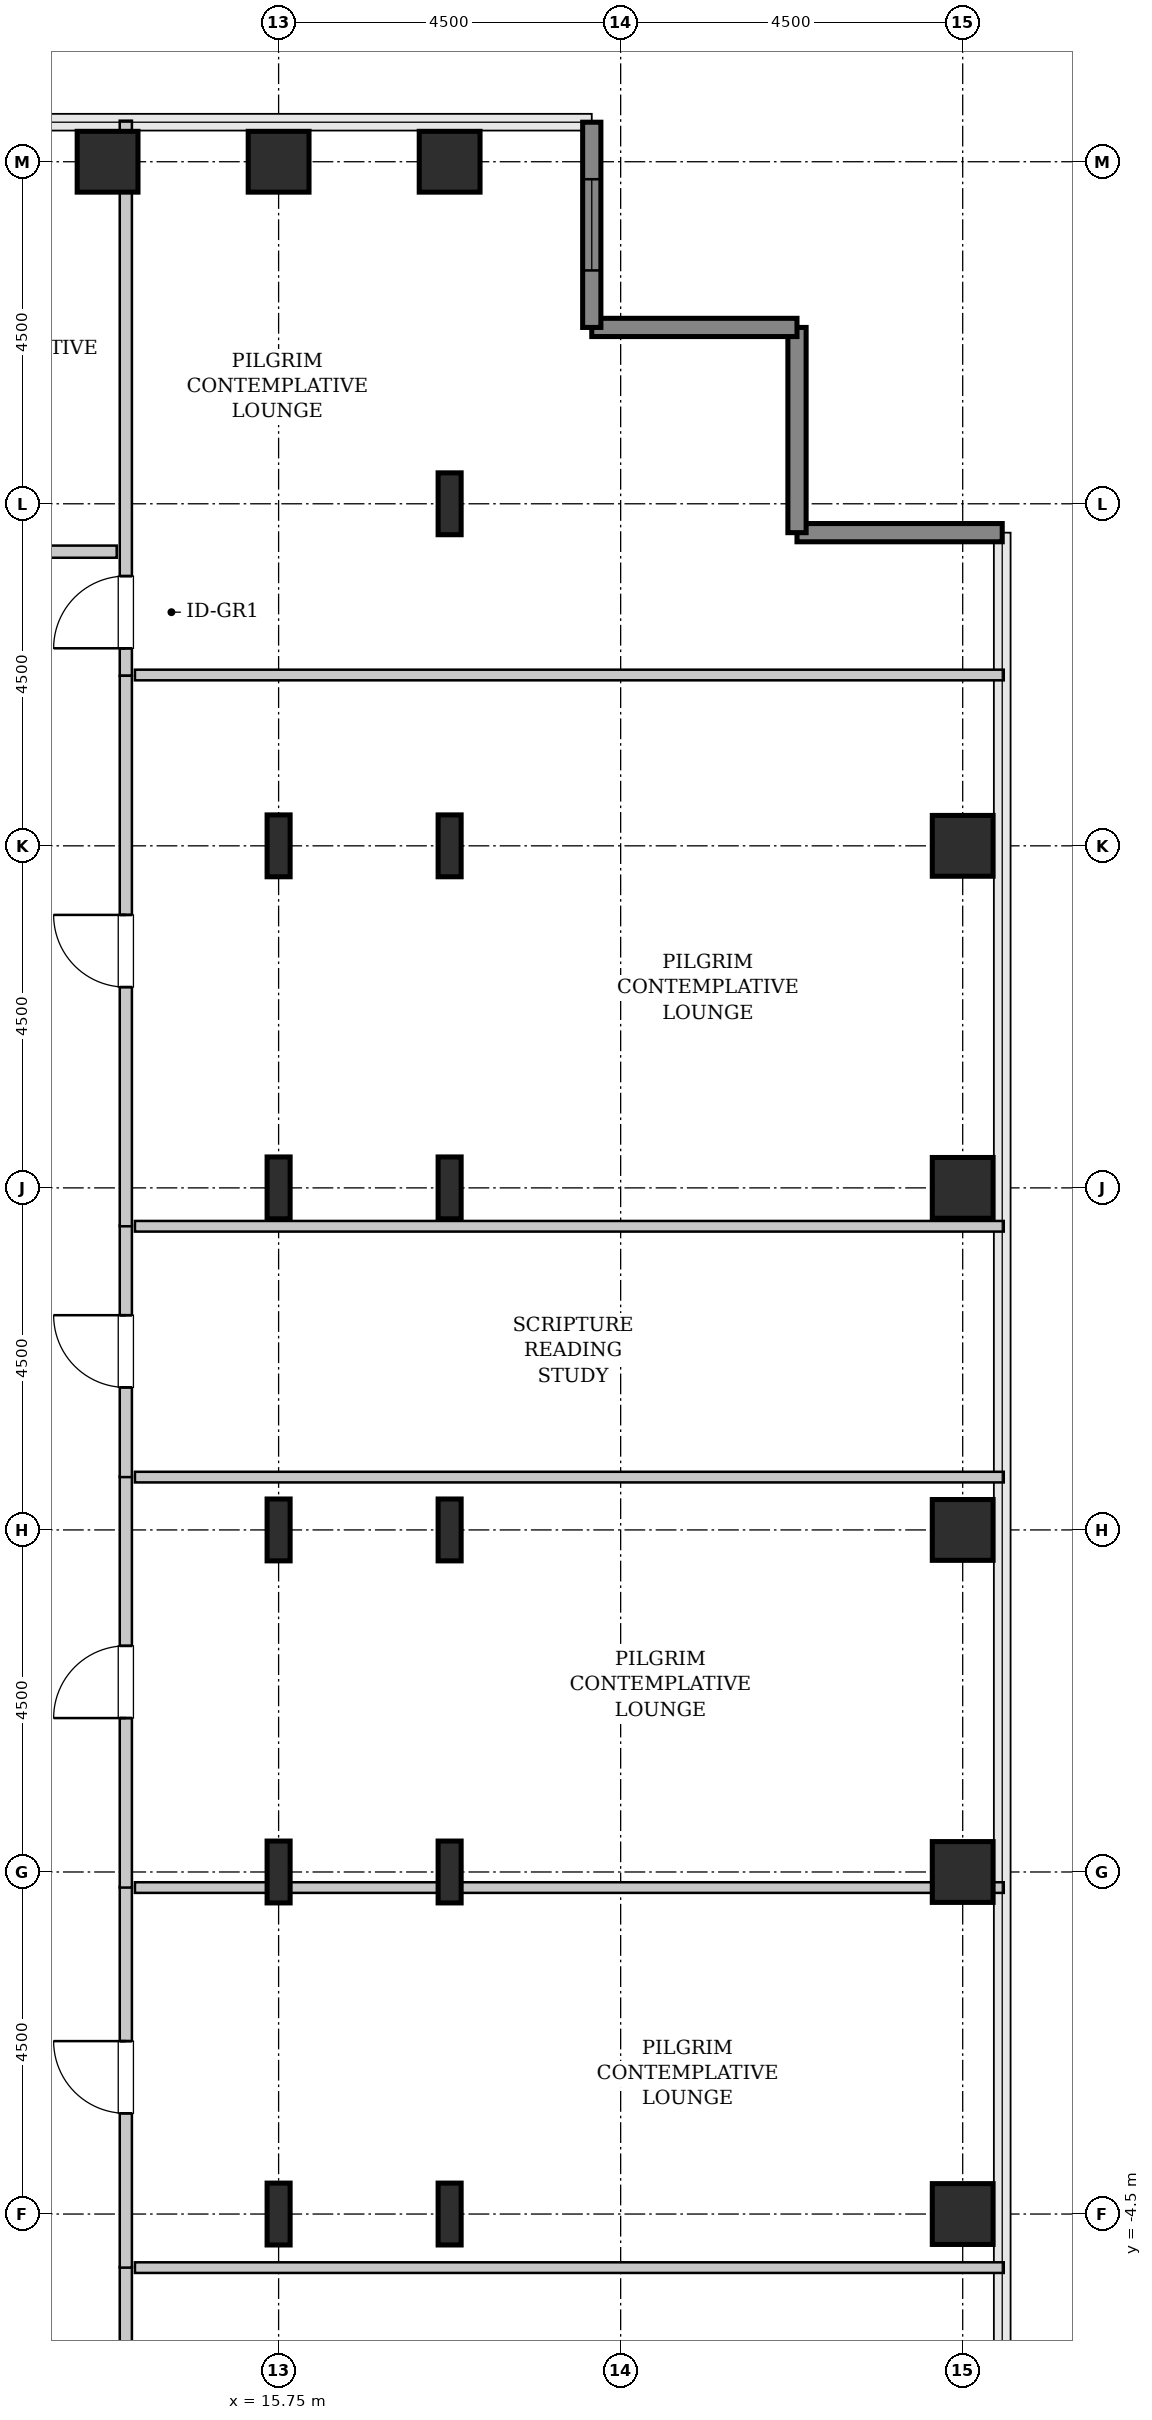
"""IFC4 building model, lengths in metres.
Left out: names, types, materials, properties, quantities, classifications, styles, units other than length and angle.
Written with IfcOpenShell. Run it as: python <this file> out.ifc"""

import sys

from ifc_helpers import new_model, si_unit, direction, frame, frame_2d, origin, origin_2d, place, context, subcontext, project, spatial, rectangle, hollow_rectangle, i_section, extrude, source, transform, mapped, element, fill, save


model = new_model("IFC4")
c1 = context("Model", 3, precision=1e-05, world=origin(), true_north=direction((0.0, 1.0)))
c2 = subcontext(c1, "Body", "Model", "MODEL_VIEW")
j1 = project(units=[si_unit("LENGTHUNIT", "METRE"), si_unit("PLANEANGLEUNIT", "RADIAN")], contexts=[c1])
p1 = place(None, origin())
s1 = spatial("IfcSite", under=j1, at=p1, CompositionType="ELEMENT")
p2 = place(p1, origin())
s2 = spatial("IfcBuilding", under=s1, at=p2, CompositionType="ELEMENT")
p3 = place(p2, frame((0.0, 0.0, 179.2)))
s3 = spatial("IfcBuildingStorey", under=s2, at=p3, CompositionType="ELEMENT", Elevation=179.2)
m1 = source(origin(), c2, "Body", "SweptSolid", [
    extrude(hollow_rectangle(XDim=0.8, YDim=0.8, WallThickness=0.04, InnerFilletRadius=0.04, OuterFilletRadius=0.08, at=origin_2d()), origin(), (0.0, 0.0, 1.0), 3.8),
])
p4 = place(p3, frame((13.5, 22.5, 0.0), z_axis=(0.0, 0.0, 1.0), x_axis=(1.0, 0.0, 0.0)))
e1 = element("IfcColumn", 1, at=p4, inside=s3, PredefinedType="COLUMN", context=c2, shape_type="MappedRepresentation", body=[
    mapped(m1, transform((0.0, 0.0, 0.0), x_axis=(1.0, 0.0, 0.0), y_axis=(0.0, 1.0, 0.0), z_axis=(0.0, 0.0, 1.0), scale=1.0)),
])
m2 = source(origin(), c2, "Body", "SweptSolid", [
    extrude(i_section(OverallWidth=0.303, OverallDepth=0.814, WebThickness=0.021, FlangeThickness=0.04, FilletRadius=0.03, at=origin_2d()), origin(), (0.0, 0.0, 1.0), 3.8),
])
for number, where, z_axis, x_axis in (
    (2, (15.75, -4.5, 0.0), (0.0, 0.0, 1.0), (1.0, 0.0, 0.0)),
    (3, (15.75, 0.0, 0.0), (0.0, 0.0, 1.0), (1.0, 0.0, 0.0)),
    (4, (15.75, 4.5, 0.0), (0.0, 0.0, 1.0), (1.0, 0.0, 0.0)),
    (5, (15.75, 9.0, 0.0), (0.0, 0.0, 1.0), (1.0, 0.0, 0.0)),
    (6, (15.75, 13.5, 0.0), (0.0, 0.0, 1.0), (1.0, 0.0, 0.0)),
):
    element("IfcColumn", number, at=place(p3, frame(where, z_axis=z_axis, x_axis=x_axis)), inside=s3, PredefinedType="COLUMN", context=c2, shape_type="MappedRepresentation", body=[
        mapped(m2, transform((0.0, 0.0, 0.0), x_axis=(1.0, 0.0, 0.0), y_axis=(0.0, 1.0, 0.0), z_axis=(0.0, 0.0, 1.0), scale=1.0)),
    ])
p5 = place(p3, frame((15.75, 22.5, 0.0), z_axis=(0.0, 0.0, 1.0), x_axis=(1.0, 0.0, 0.0)))
e7 = element("IfcColumn", 7, at=p5, inside=s3, PredefinedType="COLUMN", context=c2, shape_type="MappedRepresentation", body=[
    mapped(m1, transform((0.0, 0.0, 0.0), x_axis=(1.0, 0.0, 0.0), y_axis=(0.0, 1.0, 0.0), z_axis=(0.0, 0.0, 1.0), scale=1.0)),
])
for number, where, z_axis, x_axis in (
    (8, (18.0, -4.5, 0.0), (0.0, 0.0, 1.0), (1.0, 0.0, 0.0)),
    (9, (18.0, 0.0, 0.0), (0.0, 0.0, 1.0), (1.0, 0.0, 0.0)),
    (10, (18.0, 4.5, 0.0), (0.0, 0.0, 1.0), (1.0, 0.0, 0.0)),
    (11, (18.0, 9.0, 0.0), (0.0, 0.0, 1.0), (1.0, 0.0, 0.0)),
    (12, (18.0, 13.5, 0.0), (0.0, 0.0, 1.0), (1.0, 0.0, 0.0)),
    (13, (18.0, 18.0, 0.0), (0.0, 0.0, 1.0), (1.0, 0.0, 0.0)),
):
    element("IfcColumn", number, at=place(p3, frame(where, z_axis=z_axis, x_axis=x_axis)), inside=s3, PredefinedType="COLUMN", context=c2, shape_type="MappedRepresentation", body=[
        mapped(m2, transform((0.0, 0.0, 0.0), x_axis=(1.0, 0.0, 0.0), y_axis=(0.0, 1.0, 0.0), z_axis=(0.0, 0.0, 1.0), scale=1.0)),
    ])
for number, where, z_axis, x_axis in (
    (14, (18.0, 22.5, 0.0), (0.0, 0.0, 1.0), (1.0, 0.0, 0.0)),
    (15, (24.75, -4.5, 0.0), (0.0, 0.0, 1.0), (1.0, 0.0, 0.0)),
    (16, (24.75, 0.0, 0.0), (0.0, 0.0, 1.0), (1.0, 0.0, 0.0)),
    (17, (24.75, 4.5, 0.0), (0.0, 0.0, 1.0), (1.0, 0.0, 0.0)),
    (18, (24.75, 9.0, 0.0), (0.0, 0.0, 1.0), (1.0, 0.0, 0.0)),
    (19, (24.75, 13.5, 0.0), (0.0, 0.0, 1.0), (1.0, 0.0, 0.0)),
):
    element("IfcColumn", number, at=place(p3, frame(where, z_axis=z_axis, x_axis=x_axis)), inside=s3, PredefinedType="COLUMN", context=c2, shape_type="MappedRepresentation", body=[
        mapped(m1, transform((0.0, 0.0, 0.0), x_axis=(1.0, 0.0, 0.0), y_axis=(0.0, 1.0, 0.0), z_axis=(0.0, 0.0, 1.0), scale=1.0)),
    ])
m3 = source(origin(), c2, "Body", "SweptSolid", [
    extrude(rectangle(XDim=2.7, YDim=0.24, at=frame_2d((1.35, 0.0))), origin(), (0.0, 0.0, 1.0), 3.55),
])
for number, where, z_axis, x_axis in (
    (20, (25.27, 17.62, 0.0), (0.0, 0.0, 1.0), (-1.0, 0.0, 0.0)),
    (21, (22.57, 17.62, 0.0), (0.0, 0.0, 1.0), (0.0, 1.0, 0.0)),
    (22, (22.57, 20.32, 0.0), (0.0, 0.0, 1.0), (-1.0, 0.0, 0.0)),
):
    element("IfcWall", number, at=place(p3, frame(where, z_axis=z_axis, x_axis=x_axis)), inside=s3, PredefinedType="SHEAR", context=c2, shape_type="MappedRepresentation", body=[
        mapped(m3, transform((0.0, 0.0, 0.0), x_axis=(1.0, 0.0, 0.0), y_axis=(0.0, 1.0, 0.0), z_axis=(0.0, 0.0, 1.0), scale=1.0)),
    ])
p6 = place(p3, frame((19.87, 20.32, 0.0), z_axis=(0.0, 0.0, 1.0), x_axis=(0.0, 1.0, 0.0)))
e23 = element("IfcWall", 23, at=p6, inside=s3, PredefinedType="SHEAR", context=c2, shape_type="MappedRepresentation", body=[
    mapped(m3, transform((0.0, 0.0, 0.0), x_axis=(1.0, 0.0, 0.0), y_axis=(0.0, 1.0, 0.0), z_axis=(0.0, 0.0, 1.0), scale=1.0)),
])
p7 = place(p6, frame((0.75, 0.0, 0.85)))
e24 = element("IfcOpeningElement", 24, at=p7, cuts=e23, PredefinedType="OPENING", context=c2, shape_type="SweptSolid", body=[
    extrude(rectangle(XDim=1.2, YDim=1.8, at=frame_2d((0.6, 0.9))), frame((0.0, 0.13, 0.0), z_axis=(0.0, -1.0, 0.0), x_axis=(1.0, 0.0, 0.0)), (0.0, 0.0, 1.0), 0.26),
])
m4 = source(origin(), c2, "Body", "SweptSolid", [
    extrude(rectangle(XDim=3.31, YDim=0.16, at=frame_2d((1.655, 0.0))), origin(), (0.0, 0.0, 1.0), 3.535),
])
p8 = place(p3, frame((13.74, -8.505, 0.0), z_axis=(0.0, 0.0, 1.0), x_axis=(0.0, 1.0, 0.0)))
e25 = element("IfcWall", 25, at=p8, inside=s3, PredefinedType="PARTITIONING", context=c2, shape_type="MappedRepresentation", body=[
    mapped(m4, transform((0.0, 0.0, 0.0), x_axis=(1.0, 0.0, 0.0), y_axis=(0.0, 1.0, 0.0), z_axis=(0.0, 0.0, 1.0), scale=1.0)),
])
p9 = place(p8, frame((1.18, 0.0, 0.0)))
e26 = element("IfcOpeningElement", 26, at=p9, cuts=e25, PredefinedType="OPENING", context=c2, shape_type="SweptSolid", body=[
    extrude(rectangle(XDim=0.95, YDim=2.1, at=frame_2d((0.475, 1.05))), frame((0.0, 0.09, 0.0), z_axis=(0.0, -1.0, 0.0), x_axis=(1.0, 0.0, 0.0)), (0.0, 0.0, 1.0), 0.18),
])
m5 = source(origin(), c2, "Body", "SweptSolid", [
    extrude(rectangle(XDim=11.43, YDim=0.14, at=frame_2d((5.715, 0.0))), origin(), (0.0, 0.0, 1.0), 3.535),
])
p10 = place(p3, frame((13.86, -5.205, 0.0), z_axis=(0.0, 0.0, 1.0), x_axis=(1.0, 0.0, 0.0)))
e27 = element("IfcWall", 27, at=p10, inside=s3, PredefinedType="PARTITIONING", context=c2, shape_type="MappedRepresentation", body=[
    mapped(m5, transform((0.0, 0.0, 0.0), x_axis=(1.0, 0.0, 0.0), y_axis=(0.0, 1.0, 0.0), z_axis=(0.0, 0.0, 1.0), scale=1.0)),
])
m6 = source(origin(), c2, "Body", "SweptSolid", [
    extrude(rectangle(XDim=5.01, YDim=0.16, at=frame_2d((2.505, 0.0))), origin(), (0.0, 0.0, 1.0), 3.535),
])
p11 = place(p3, frame((13.74, -5.205, 0.0), z_axis=(0.0, 0.0, 1.0), x_axis=(0.0, 1.0, 0.0)))
e28 = element("IfcWall", 28, at=p11, inside=s3, PredefinedType="PARTITIONING", context=c2, shape_type="MappedRepresentation", body=[
    mapped(m6, transform((0.0, 0.0, 0.0), x_axis=(1.0, 0.0, 0.0), y_axis=(0.0, 1.0, 0.0), z_axis=(0.0, 0.0, 1.0), scale=1.0)),
])
p12 = place(p11, frame((2.03, 0.0, 0.0)))
e29 = element("IfcOpeningElement", 29, at=p12, cuts=e28, PredefinedType="OPENING", context=c2, shape_type="SweptSolid", body=[
    extrude(rectangle(XDim=0.95, YDim=2.1, at=frame_2d((0.475, 1.05))), frame((0.0, 0.09, 0.0), z_axis=(0.0, -1.0, 0.0), x_axis=(1.0, 0.0, 0.0)), (0.0, 0.0, 1.0), 0.18),
])
m7 = source(origin(), c2, "Body", "SweptSolid", [
    extrude(rectangle(XDim=11.43, YDim=0.14, at=frame_2d((5.715, 0.0))), origin(), (0.0, 0.0, 1.0), 2.875),
])
p13 = place(p3, frame((13.86, -0.205, 0.0), z_axis=(0.0, 0.0, 1.0), x_axis=(1.0, 0.0, 0.0)))
e30 = element("IfcWall", 30, at=p13, inside=s3, PredefinedType="PARTITIONING", context=c2, shape_type="MappedRepresentation", body=[
    mapped(m7, transform((0.0, 0.0, 0.0), x_axis=(1.0, 0.0, 0.0), y_axis=(0.0, 1.0, 0.0), z_axis=(0.0, 0.0, 1.0), scale=1.0)),
])
m8 = source(origin(), c2, "Body", "SweptSolid", [
    extrude(rectangle(XDim=5.41, YDim=0.16, at=frame_2d((2.705, 0.0))), origin(), (0.0, 0.0, 1.0), 3.535),
])
p14 = place(p3, frame((13.74, -0.205, 0.0), z_axis=(0.0, 0.0, 1.0), x_axis=(0.0, 1.0, 0.0)))
e31 = element("IfcWall", 31, at=p14, inside=s3, PredefinedType="PARTITIONING", context=c2, shape_type="MappedRepresentation", body=[
    mapped(m8, transform((0.0, 0.0, 0.0), x_axis=(1.0, 0.0, 0.0), y_axis=(0.0, 1.0, 0.0), z_axis=(0.0, 0.0, 1.0), scale=1.0)),
])
p15 = place(p14, frame((2.23, 0.0, 0.0)))
e32 = element("IfcOpeningElement", 32, at=p15, cuts=e31, PredefinedType="OPENING", context=c2, shape_type="SweptSolid", body=[
    extrude(rectangle(XDim=0.95, YDim=2.1, at=frame_2d((0.475, 1.05))), frame((0.0, 0.09, 0.0), z_axis=(0.0, -1.0, 0.0), x_axis=(1.0, 0.0, 0.0)), (0.0, 0.0, 1.0), 0.18),
])
p16 = place(p3, frame((13.86, 5.195, 0.0), z_axis=(0.0, 0.0, 1.0), x_axis=(1.0, 0.0, 0.0)))
e33 = element("IfcWall", 33, at=p16, inside=s3, PredefinedType="PARTITIONING", context=c2, shape_type="MappedRepresentation", body=[
    mapped(m5, transform((0.0, 0.0, 0.0), x_axis=(1.0, 0.0, 0.0), y_axis=(0.0, 1.0, 0.0), z_axis=(0.0, 0.0, 1.0), scale=1.0)),
])
p17 = place(p3, frame((13.74, 5.195, 0.0), z_axis=(0.0, 0.0, 1.0), x_axis=(0.0, 1.0, 0.0)))
e34 = element("IfcWall", 34, at=p17, inside=s3, PredefinedType="PARTITIONING", context=c2, shape_type="MappedRepresentation", body=[
    mapped(m4, transform((0.0, 0.0, 0.0), x_axis=(1.0, 0.0, 0.0), y_axis=(0.0, 1.0, 0.0), z_axis=(0.0, 0.0, 1.0), scale=1.0)),
])
p18 = place(p17, frame((1.18, 0.0, 0.0)))
e35 = element("IfcOpeningElement", 35, at=p18, cuts=e34, PredefinedType="OPENING", context=c2, shape_type="SweptSolid", body=[
    extrude(rectangle(XDim=0.95, YDim=2.1, at=frame_2d((0.475, 1.05))), frame((0.0, 0.09, 0.0), z_axis=(0.0, -1.0, 0.0), x_axis=(1.0, 0.0, 0.0)), (0.0, 0.0, 1.0), 0.18),
])
p19 = place(p3, frame((13.86, 8.495, 0.0), z_axis=(0.0, 0.0, 1.0), x_axis=(1.0, 0.0, 0.0)))
e36 = element("IfcWall", 36, at=p19, inside=s3, PredefinedType="PARTITIONING", context=c2, shape_type="MappedRepresentation", body=[
    mapped(m7, transform((0.0, 0.0, 0.0), x_axis=(1.0, 0.0, 0.0), y_axis=(0.0, 1.0, 0.0), z_axis=(0.0, 0.0, 1.0), scale=1.0)),
])
m9 = source(origin(), c2, "Body", "SweptSolid", [
    extrude(rectangle(XDim=7.302, YDim=0.16, at=frame_2d((3.651, 0.0))), origin(), (0.0, 0.0, 1.0), 3.535),
])
p20 = place(p3, frame((13.74, 15.738, 0.0), z_axis=(0.0, 0.0, 1.0), x_axis=(0.0, 1.0, 0.0)))
e37 = element("IfcWall", 37, at=p20, inside=s3, PredefinedType="PARTITIONING", context=c2, shape_type="MappedRepresentation", body=[
    mapped(m9, transform((0.0, 0.0, 0.0), x_axis=(1.0, 0.0, 0.0), y_axis=(0.0, 1.0, 0.0), z_axis=(0.0, 0.0, 1.0), scale=1.0)),
])
p21 = place(p20, frame((0.361, 0.0, 0.0)))
e38 = element("IfcOpeningElement", 38, at=p21, cuts=e37, PredefinedType="OPENING", context=c2, shape_type="SweptSolid", body=[
    extrude(rectangle(XDim=0.95, YDim=2.1, at=frame_2d((0.475, 1.05))), frame((0.0, 0.09, 0.0), z_axis=(0.0, -1.0, 0.0), x_axis=(1.0, 0.0, 0.0)), (0.0, 0.0, 1.0), 0.18),
])
p22 = place(p3, frame((13.86, 15.748, 0.0), z_axis=(0.0, 0.0, 1.0), x_axis=(1.0, 0.0, 0.0)))
e39 = element("IfcWall", 39, at=p22, inside=s3, PredefinedType="PARTITIONING", context=c2, shape_type="MappedRepresentation", body=[
    mapped(m5, transform((0.0, 0.0, 0.0), x_axis=(1.0, 0.0, 0.0), y_axis=(0.0, 1.0, 0.0), z_axis=(0.0, 0.0, 1.0), scale=1.0)),
])
m10 = source(origin(), c2, "Body", "SweptSolid", [
    extrude(rectangle(XDim=7.242, YDim=0.16, at=frame_2d((3.621, 0.0))), origin(), (0.0, 0.0, 1.0), 3.535),
])
p23 = place(p3, frame((13.74, 8.495, 0.0), z_axis=(0.0, 0.0, 1.0), x_axis=(0.0, 1.0, 0.0)))
e40 = element("IfcWall", 40, at=p23, inside=s3, PredefinedType="PARTITIONING", context=c2, shape_type="MappedRepresentation", body=[
    mapped(m10, transform((0.0, 0.0, 0.0), x_axis=(1.0, 0.0, 0.0), y_axis=(0.0, 1.0, 0.0), z_axis=(0.0, 0.0, 1.0), scale=1.0)),
])
p24 = place(p23, frame((3.146, 0.0, 0.0)))
e41 = element("IfcOpeningElement", 41, at=p24, cuts=e40, PredefinedType="OPENING", context=c2, shape_type="SweptSolid", body=[
    extrude(rectangle(XDim=0.95, YDim=2.1, at=frame_2d((0.475, 1.05))), frame((0.0, 0.09, 0.0), z_axis=(0.0, -1.0, 0.0), x_axis=(1.0, 0.0, 0.0)), (0.0, 0.0, 1.0), 0.18),
])
m11 = source(origin(), c2, "Body", "SweptSolid", [
    extrude(rectangle(XDim=5.825, YDim=0.16, at=frame_2d((2.913, 0.0))), origin(), (0.0, 0.0, 1.0), 3.535),
])
p25 = place(p3, frame((7.795, 17.37, 0.0), z_axis=(0.0, 0.0, 1.0), x_axis=(1.0, 0.0, 0.0)))
e42 = element("IfcWall", 42, at=p25, inside=s3, PredefinedType="PARTITIONING", context=c2, shape_type="MappedRepresentation", body=[
    mapped(m11, transform((0.0, 0.0, 0.0), x_axis=(1.0, 0.0, 0.0), y_axis=(0.0, 1.0, 0.0), z_axis=(0.0, 0.0, 1.0), scale=1.0)),
])
p26 = place(p25, frame((2.092, 0.0, 0.0)))
e43 = element("IfcOpeningElement", 43, at=p26, cuts=e42, PredefinedType="OPENING", context=c2, shape_type="SweptSolid", body=[
    extrude(rectangle(XDim=0.95, YDim=2.1, at=frame_2d((0.475, 1.05))), frame((0.0, 0.09, 0.0), z_axis=(0.0, -1.0, 0.0), x_axis=(1.0, 0.0, 0.0)), (0.0, 0.0, 1.0), 0.18),
])
m12 = source(origin(), c2, "Body", "SweptSolid", [
    extrude(rectangle(XDim=1.2, YDim=1.8, at=frame_2d((0.6, 0.9))), frame((0.0, 0.03, 0.0), z_axis=(0.0, -1.0, 0.0), x_axis=(1.0, 0.0, 0.0)), (0.0, 0.0, 1.0), 0.06),
])
p27 = place(p7, origin())
e44 = element("IfcWindow", 44, at=p27, inside=s3, PartitioningType="SINGLE_PANEL", PredefinedType="WINDOW", context=c2, shape_type="MappedRepresentation", body=[
    mapped(m12, transform((0.0, 0.0, 0.0), x_axis=(1.0, 0.0, 0.0), y_axis=(0.0, 1.0, 0.0), z_axis=(0.0, 0.0, 1.0), scale=1.0)),
])
fill(e24, e44)
m13 = source(origin(), c2, "Body", "SweptSolid", [
    extrude(rectangle(XDim=0.95, YDim=2.1, at=frame_2d((0.475, 1.05))), frame((0.0, 0.025, 0.0), z_axis=(0.0, -1.0, 0.0), x_axis=(1.0, 0.0, 0.0)), (0.0, 0.0, 1.0), 0.05),
])
p28 = place(p12, origin())
e45 = element("IfcDoor", 45, at=p28, inside=s3, OperationType="SINGLE_SWING_RIGHT", PredefinedType="DOOR", context=c2, shape_type="MappedRepresentation", body=[
    mapped(m13, transform((0.0, 0.0, 0.0), x_axis=(1.0, 0.0, 0.0), y_axis=(0.0, 1.0, 0.0), z_axis=(0.0, 0.0, 1.0), scale=1.0)),
])
fill(e29, e45)
p29 = place(p15, origin())
e46 = element("IfcDoor", 46, at=p29, inside=s3, OperationType="SINGLE_SWING_LEFT", PredefinedType="DOOR", context=c2, shape_type="MappedRepresentation", body=[
    mapped(m13, transform((0.0, 0.0, 0.0), x_axis=(1.0, 0.0, 0.0), y_axis=(0.0, 1.0, 0.0), z_axis=(0.0, 0.0, 1.0), scale=1.0)),
])
fill(e32, e46)
p30 = place(p18, origin())
e47 = element("IfcDoor", 47, at=p30, inside=s3, OperationType="SINGLE_SWING_RIGHT", PredefinedType="DOOR", context=c2, shape_type="MappedRepresentation", body=[
    mapped(m13, transform((0.0, 0.0, 0.0), x_axis=(1.0, 0.0, 0.0), y_axis=(0.0, 1.0, 0.0), z_axis=(0.0, 0.0, 1.0), scale=1.0)),
])
fill(e35, e47)
p31 = place(p21, origin())
e48 = element("IfcDoor", 48, at=p31, inside=s3, OperationType="SINGLE_SWING_LEFT", PredefinedType="DOOR", context=c2, shape_type="MappedRepresentation", body=[
    mapped(m13, transform((0.0, 0.0, 0.0), x_axis=(1.0, 0.0, 0.0), y_axis=(0.0, 1.0, 0.0), z_axis=(0.0, 0.0, 1.0), scale=1.0)),
])
fill(e38, e48)
p32 = place(p24, origin())
e49 = element("IfcDoor", 49, at=p32, inside=s3, OperationType="SINGLE_SWING_RIGHT", PredefinedType="DOOR", context=c2, shape_type="MappedRepresentation", body=[
    mapped(m13, transform((0.0, 0.0, 0.0), x_axis=(1.0, 0.0, 0.0), y_axis=(0.0, 1.0, 0.0), z_axis=(0.0, 0.0, 1.0), scale=1.0)),
])
fill(e41, e49)
save(model, sys.argv[1])
